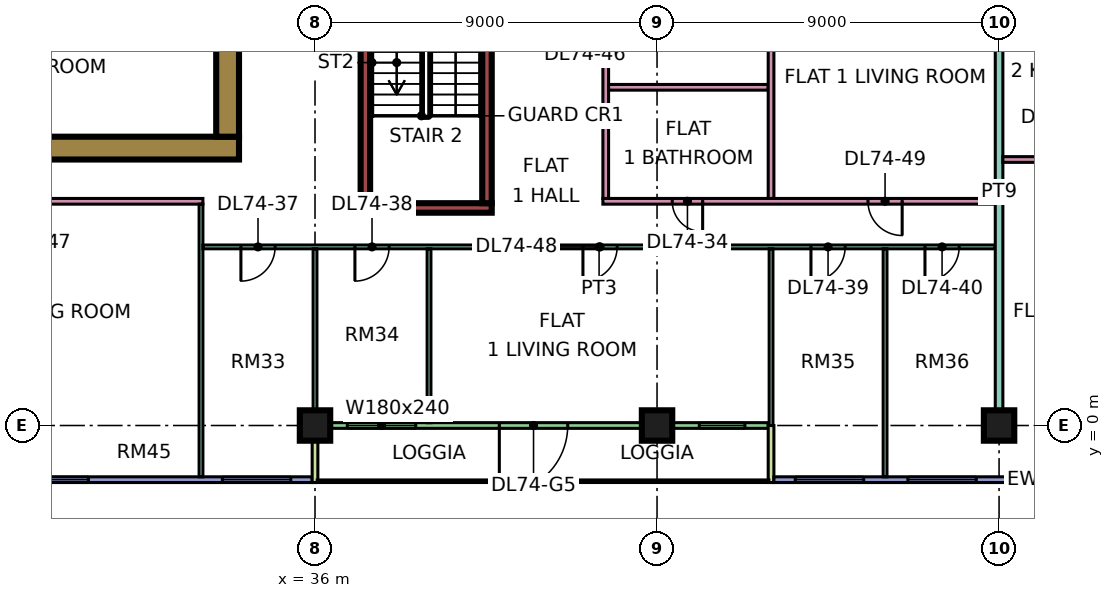
"""IFC4 building model, lengths in metres.
Left out: names, types, materials, properties, quantities, classifications, styles, units other than length and angle.
Written with IfcOpenShell. Run it as: python <this file> out.ifc"""

import sys

from ifc_helpers import new_model, si_unit, direction, frame, frame_2d, origin, origin_2d, place, context, subcontext, project, spatial, rectangle, extrude, element, fill, save


model = new_model("IFC4")
c1 = context("Model", 3, precision=1e-05, world=origin(), true_north=direction((0.0, 1.0)))
c2 = subcontext(c1, "Body", "Model", "MODEL_VIEW")
j1 = project(units=[si_unit("LENGTHUNIT", "METRE"), si_unit("PLANEANGLEUNIT", "RADIAN")], contexts=[c1])
p1 = place(None, origin())
s1 = spatial("IfcSite", under=j1, at=p1, CompositionType="ELEMENT")
p2 = place(p1, origin())
s2 = spatial("IfcBuilding", under=s1, at=p2, CompositionType="ELEMENT")
p3 = place(p2, frame((0.0, 0.0, 314.65)))
s3 = spatial("IfcBuildingStorey", under=s2, at=p3, CompositionType="ELEMENT", Elevation=314.65)
for number, where, z_axis, x_axis in (
    (1, (36.0, 0.0, 0.0), (0.0, 0.0, 1.0), (1.0, 0.0, 0.0)),
    (2, (45.0, 0.0, 0.0), (0.0, 0.0, 1.0), (1.0, 0.0, 0.0)),
    (3, (54.0, 0.0, 0.0), (0.0, 0.0, 1.0), (1.0, 0.0, 0.0)),
):
    element("IfcColumn", number, at=place(p3, frame(where, z_axis=z_axis, x_axis=x_axis)), inside=s3, PredefinedType="COLUMN", context=c2, shape_type="SweptSolid", body=[
        extrude(rectangle(XDim=0.8, YDim=0.8, at=origin_2d()), origin(), (0.0, 0.0, 1.0), 3.75),
    ])
p4 = place(p3, frame((9.0, 7.3, 0.0), z_axis=(0.0, 0.0, 1.0), x_axis=(1.0, 0.0, 0.0)))
e4 = element("IfcWall", 4, at=p4, inside=s3, PredefinedType="SHEAR", context=c2, shape_type="SweptSolid", body=[
    extrude(rectangle(XDim=25.0, YDim=0.6, at=frame_2d((12.5, 0.0))), origin(), (0.0, 0.0, 1.0), 3.75),
])
p5 = place(p3, frame((33.7, 7.6, 0.0), z_axis=(0.0, 0.0, 1.0), x_axis=(0.0, 1.0, 0.0)))
e5 = element("IfcWall", 5, at=p5, inside=s3, PredefinedType="SHEAR", context=c2, shape_type="SweptSolid", body=[
    extrude(rectangle(XDim=11.8, YDim=0.6, at=frame_2d((5.9, 0.0))), origin(), (0.0, 0.0, 1.0), 3.75),
])
p6 = place(p5, frame((5.6, 0.0, 0.0)))
e6 = element("IfcOpeningElement", 6, at=p6, cuts=e5, PredefinedType="OPENING", context=c2, shape_type="SweptSolid", body=[
    extrude(rectangle(XDim=1.8, YDim=2.4, at=frame_2d((0.9, 1.2))), frame((0.0, 0.31, 0.0), z_axis=(0.0, -1.0, 0.0), x_axis=(1.0, 0.0, 0.0)), (0.0, 0.0, 1.0), 0.62),
])
p7 = place(p3, frame((37.2, 5.725, 0.0), z_axis=(0.0, 0.0, 1.0), x_axis=(1.0, 0.0, 0.0)))
e7 = element("IfcWall", 7, at=p7, inside=s3, PredefinedType="SHEAR", context=c2, shape_type="SweptSolid", body=[
    extrude(rectangle(XDim=3.45, YDim=0.25, at=frame_2d((1.725, 0.0))), origin(), (0.0, 0.0, 1.0), 3.75),
])
for number, where, z_axis, x_axis in (
    (8, (37.325, 5.85, 0.0), (0.0, 0.0, 1.0), (0.0, 1.0, 0.0)),
    (9, (40.525, 5.85, 0.0), (0.0, 0.0, 1.0), (0.0, 1.0, 0.0)),
):
    element("IfcWall", number, at=place(p3, frame(where, z_axis=z_axis, x_axis=x_axis)), inside=s3, PredefinedType="SHEAR", context=c2, shape_type="SweptSolid", body=[
        extrude(rectangle(XDim=6.5, YDim=0.25, at=frame_2d((3.25, 0.0))), origin(), (0.0, 0.0, 1.0), 3.75),
    ])
p8 = place(p3, frame((24.075, -1.425, 0.0), z_axis=(0.0, 0.0, 1.0), x_axis=(1.0, 0.0, 0.0)))
e10 = element("IfcWall", 10, at=p8, inside=s3, PredefinedType="SOLIDWALL", context=c2, shape_type="SweptSolid", body=[
    extrude(rectangle(XDim=11.85, YDim=0.15, at=frame_2d((5.925, 0.0))), origin(), (0.0, 0.0, 1.0), 3.35),
])
p9 = place(p8, frame((2.962, 0.0, 0.45)))
e11 = element("IfcOpeningElement", 11, at=p9, cuts=e10, PredefinedType="OPENING", context=c2, shape_type="SweptSolid", body=[
    extrude(rectangle(XDim=3.0, YDim=2.4, at=frame_2d((1.5, 1.2))), frame((0.0, 0.085, 0.0), z_axis=(0.0, -1.0, 0.0), x_axis=(1.0, 0.0, 0.0)), (0.0, 0.0, 1.0), 0.17),
])
p10 = place(p8, frame((9.488, 0.0, 0.45)))
e12 = element("IfcOpeningElement", 12, at=p10, cuts=e10, PredefinedType="OPENING", context=c2, shape_type="SweptSolid", body=[
    extrude(rectangle(XDim=1.8, YDim=2.4, at=frame_2d((0.9, 1.2))), frame((0.0, 0.085, 0.0), z_axis=(0.0, -1.0, 0.0), x_axis=(1.0, 0.0, 0.0)), (0.0, 0.0, 1.0), 0.17),
])
p11 = place(p3, frame((36.075, 0.0, 0.0), z_axis=(0.0, 0.0, 1.0), x_axis=(1.0, 0.0, 0.0)))
e13 = element("IfcWall", 13, at=p11, inside=s3, PredefinedType="SOLIDWALL", context=c2, shape_type="SweptSolid", body=[
    extrude(rectangle(XDim=11.85, YDim=0.15, at=frame_2d((5.925, 0.0))), origin(), (0.0, 0.0, 1.0), 3.35),
])
p12 = place(p11, frame((0.775, 0.0, 0.45)))
e14 = element("IfcOpeningElement", 14, at=p12, cuts=e13, PredefinedType="OPENING", context=c2, shape_type="SweptSolid", body=[
    extrude(rectangle(XDim=1.8, YDim=2.4, at=frame_2d((0.9, 1.2))), frame((0.0, 0.085, 0.0), z_axis=(0.0, -1.0, 0.0), x_axis=(1.0, 0.0, 0.0)), (0.0, 0.0, 1.0), 0.17),
])
p13 = place(p11, frame((4.775, 0.0, 0.0)))
e15 = element("IfcOpeningElement", 15, at=p13, cuts=e13, PredefinedType="OPENING", context=c2, shape_type="SweptSolid", body=[
    extrude(rectangle(XDim=1.8, YDim=2.4, at=frame_2d((0.9, 1.2))), frame((0.0, 0.085, 0.0), z_axis=(0.0, -1.0, 0.0), x_axis=(1.0, 0.0, 0.0)), (0.0, 0.0, 1.0), 0.17),
])
p14 = place(p11, frame((10.038, 0.0, 0.45)))
e16 = element("IfcOpeningElement", 16, at=p14, cuts=e13, PredefinedType="OPENING", context=c2, shape_type="SweptSolid", body=[
    extrude(rectangle(XDim=1.2, YDim=2.4, at=frame_2d((0.6, 1.2))), frame((0.0, 0.085, 0.0), z_axis=(0.0, -1.0, 0.0), x_axis=(1.0, 0.0, 0.0)), (0.0, 0.0, 1.0), 0.17),
])
for number, where, z_axis, x_axis in (
    (17, (36.0, -1.5, 0.0), (0.0, 0.0, 1.0), (0.0, 1.0, 0.0)),
    (18, (48.0, -1.5, 0.0), (0.0, 0.0, 1.0), (0.0, 1.0, 0.0)),
):
    element("IfcWall", number, at=place(p3, frame(where, z_axis=z_axis, x_axis=x_axis)), inside=s3, PredefinedType="SOLIDWALL", context=c2, shape_type="SweptSolid", body=[
        extrude(rectangle(XDim=1.5, YDim=0.15, at=frame_2d((0.75, 0.0))), origin(), (0.0, 0.0, 1.0), 3.35),
    ])
p15 = place(p3, frame((48.075, -1.425, 0.0), z_axis=(0.0, 0.0, 1.0), x_axis=(1.0, 0.0, 0.0)))
e19 = element("IfcWall", 19, at=p15, inside=s3, PredefinedType="SOLIDWALL", context=c2, shape_type="SweptSolid", body=[
    extrude(rectangle(XDim=13.425, YDim=0.15, at=frame_2d((6.712, 0.0))), origin(), (0.0, 0.0, 1.0), 3.35),
])
p16 = place(p15, frame((0.562, 0.0, 0.45)))
e20 = element("IfcOpeningElement", 20, at=p16, cuts=e19, PredefinedType="OPENING", context=c2, shape_type="SweptSolid", body=[
    extrude(rectangle(XDim=1.8, YDim=2.4, at=frame_2d((0.9, 1.2))), frame((0.0, 0.085, 0.0), z_axis=(0.0, -1.0, 0.0), x_axis=(1.0, 0.0, 0.0)), (0.0, 0.0, 1.0), 0.17),
])
p17 = place(p15, frame((3.525, 0.0, 0.45)))
e21 = element("IfcOpeningElement", 21, at=p17, cuts=e19, PredefinedType="OPENING", context=c2, shape_type="SweptSolid", body=[
    extrude(rectangle(XDim=1.8, YDim=2.4, at=frame_2d((0.9, 1.2))), frame((0.0, 0.085, 0.0), z_axis=(0.0, -1.0, 0.0), x_axis=(1.0, 0.0, 0.0)), (0.0, 0.0, 1.0), 0.17),
])
p18 = place(p15, frame((7.425, 0.0, 0.45)))
e22 = element("IfcOpeningElement", 22, at=p18, cuts=e19, PredefinedType="OPENING", context=c2, shape_type="SweptSolid", body=[
    extrude(rectangle(XDim=3.0, YDim=2.4, at=frame_2d((1.5, 1.2))), frame((0.0, 0.085, 0.0), z_axis=(0.0, -1.0, 0.0), x_axis=(1.0, 0.0, 0.0)), (0.0, 0.0, 1.0), 0.17),
])
p19 = place(p15, frame((12.225, 0.0, 0.45)))
e23 = element("IfcOpeningElement", 23, at=p19, cuts=e19, PredefinedType="OPENING", context=c2, shape_type="SweptSolid", body=[
    extrude(rectangle(XDim=0.9, YDim=2.4, at=frame_2d((0.45, 1.2))), frame((0.0, 0.085, 0.0), z_axis=(0.0, -1.0, 0.0), x_axis=(1.0, 0.0, 0.0)), (0.0, 0.0, 1.0), 0.17),
])
p20 = place(p3, frame((11.95, 5.9, 0.0), z_axis=(0.0, 0.0, 1.0), x_axis=(1.0, 0.0, 0.0)))
e24 = element("IfcWall", 24, at=p20, inside=s3, PredefinedType="PARTITIONING", context=c2, shape_type="SweptSolid", body=[
    extrude(rectangle(XDim=21.1, YDim=0.15, at=frame_2d((10.55, 0.0))), origin(), (0.0, 0.0, 1.0), 3.35),
])
p21 = place(p20, frame((1.1, 0.0, 0.0)))
e25 = element("IfcOpeningElement", 25, at=p21, cuts=e24, PredefinedType="OPENING", context=c2, shape_type="SweptSolid", body=[
    extrude(rectangle(XDim=0.9, YDim=2.1, at=frame_2d((0.45, 1.05))), frame((0.0, 0.085, 0.0), z_axis=(0.0, -1.0, 0.0), x_axis=(1.0, 0.0, 0.0)), (0.0, 0.0, 1.0), 0.17),
])
p22 = place(p20, frame((4.1, 0.0, 0.0)))
e26 = element("IfcOpeningElement", 26, at=p22, cuts=e24, PredefinedType="OPENING", context=c2, shape_type="SweptSolid", body=[
    extrude(rectangle(XDim=0.9, YDim=2.1, at=frame_2d((0.45, 1.05))), frame((0.0, 0.085, 0.0), z_axis=(0.0, -1.0, 0.0), x_axis=(1.0, 0.0, 0.0)), (0.0, 0.0, 1.0), 0.17),
])
p23 = place(p20, frame((10.1, 0.0, 0.0)))
e27 = element("IfcOpeningElement", 27, at=p23, cuts=e24, PredefinedType="OPENING", context=c2, shape_type="SweptSolid", body=[
    extrude(rectangle(XDim=0.9, YDim=2.1, at=frame_2d((0.45, 1.05))), frame((0.0, 0.085, 0.0), z_axis=(0.0, -1.0, 0.0), x_axis=(1.0, 0.0, 0.0)), (0.0, 0.0, 1.0), 0.17),
])
p24 = place(p20, frame((16.1, 0.0, 0.0)))
e28 = element("IfcOpeningElement", 28, at=p24, cuts=e24, PredefinedType="OPENING", context=c2, shape_type="SweptSolid", body=[
    extrude(rectangle(XDim=0.9, YDim=2.1, at=frame_2d((0.45, 1.05))), frame((0.0, 0.085, 0.0), z_axis=(0.0, -1.0, 0.0), x_axis=(1.0, 0.0, 0.0)), (0.0, 0.0, 1.0), 0.17),
])
p25 = place(p3, frame((33.0, -1.35, 0.0), z_axis=(0.0, 0.0, 1.0), x_axis=(0.0, 1.0, 0.0)))
e29 = element("IfcWall", 29, at=p25, inside=s3, PredefinedType="PARTITIONING", context=c2, shape_type="SweptSolid", body=[
    extrude(rectangle(XDim=7.175, YDim=0.1, at=frame_2d((3.587, 0.0))), origin(), (0.0, 0.0, 1.0), 3.35),
])
p26 = place(p3, frame((33.05, 4.7, 0.0), z_axis=(0.0, 0.0, 1.0), x_axis=(1.0, 0.0, 0.0)))
e30 = element("IfcWall", 30, at=p26, inside=s3, PredefinedType="PARTITIONING", context=c2, shape_type="SweptSolid", body=[
    extrude(rectangle(XDim=20.85, YDim=0.1, at=frame_2d((10.425, 0.0))), origin(), (0.0, 0.0, 1.0), 3.35),
])
p27 = place(p26, frame((1.0, 0.0, 0.0)))
e31 = element("IfcOpeningElement", 31, at=p27, cuts=e30, PredefinedType="OPENING", context=c2, shape_type="SweptSolid", body=[
    extrude(rectangle(XDim=0.9, YDim=2.1, at=frame_2d((0.45, 1.05))), frame((0.0, 0.06, 0.0), z_axis=(0.0, -1.0, 0.0), x_axis=(1.0, 0.0, 0.0)), (0.0, 0.0, 1.0), 0.12),
])
p28 = place(p26, frame((4.0, 0.0, 0.0)))
e32 = element("IfcOpeningElement", 32, at=p28, cuts=e30, PredefinedType="OPENING", context=c2, shape_type="SweptSolid", body=[
    extrude(rectangle(XDim=0.9, YDim=2.1, at=frame_2d((0.45, 1.05))), frame((0.0, 0.06, 0.0), z_axis=(0.0, -1.0, 0.0), x_axis=(1.0, 0.0, 0.0)), (0.0, 0.0, 1.0), 0.12),
])
p29 = place(p26, frame((16.0, 0.0, 0.0)))
e33 = element("IfcOpeningElement", 33, at=p29, cuts=e30, PredefinedType="OPENING", context=c2, shape_type="SweptSolid", body=[
    extrude(rectangle(XDim=0.9, YDim=2.1, at=frame_2d((0.45, 1.05))), frame((0.0, 0.06, 0.0), z_axis=(0.0, -1.0, 0.0), x_axis=(1.0, 0.0, 0.0)), (0.0, 0.0, 1.0), 0.12),
])
p30 = place(p26, frame((19.0, 0.0, 0.0)))
e34 = element("IfcOpeningElement", 34, at=p30, cuts=e30, PredefinedType="OPENING", context=c2, shape_type="SweptSolid", body=[
    extrude(rectangle(XDim=0.9, YDim=2.1, at=frame_2d((0.45, 1.05))), frame((0.0, 0.06, 0.0), z_axis=(0.0, -1.0, 0.0), x_axis=(1.0, 0.0, 0.0)), (0.0, 0.0, 1.0), 0.12),
])
p31 = place(p26, frame((10.0, 0.0, 0.0)))
e35 = element("IfcOpeningElement", 35, at=p31, cuts=e30, PredefinedType="OPENING", context=c2, shape_type="SweptSolid", body=[
    extrude(rectangle(XDim=0.9, YDim=2.1, at=frame_2d((0.45, 1.05))), frame((0.0, 0.06, 0.0), z_axis=(0.0, -1.0, 0.0), x_axis=(1.0, 0.0, 0.0)), (0.0, 0.0, 1.0), 0.12),
])
p32 = place(p3, frame((36.0, 0.0, 0.0), z_axis=(0.0, 0.0, 1.0), x_axis=(0.0, 1.0, 0.0)))
e36 = element("IfcWall", 36, at=p32, inside=s3, PredefinedType="PARTITIONING", context=c2, shape_type="SweptSolid", body=[
    extrude(rectangle(XDim=4.65, YDim=0.1, at=frame_2d((2.325, 0.0))), origin(), (0.0, 0.0, 1.0), 3.35),
])
p33 = place(p3, frame((39.0, 0.074, 0.0), z_axis=(0.0, 0.0, 1.0), x_axis=(0.0, 1.0, 0.0)))
e37 = element("IfcWall", 37, at=p33, inside=s3, PredefinedType="PARTITIONING", context=c2, shape_type="SweptSolid", body=[
    extrude(rectangle(XDim=4.576, YDim=0.1, at=frame_2d((2.288, 0.0))), origin(), (0.0, 0.0, 1.0), 3.35),
])
p34 = place(p3, frame((43.575, 5.9, 0.0), z_axis=(0.0, 0.0, 1.0), x_axis=(1.0, 0.0, 0.0)))
e38 = element("IfcWall", 38, at=p34, inside=s3, PredefinedType="PARTITIONING", context=c2, shape_type="SweptSolid", body=[
    extrude(rectangle(XDim=10.325, YDim=0.15, at=frame_2d((5.163, 0.0))), origin(), (0.0, 0.0, 1.0), 3.35),
])
p35 = place(p34, frame((1.825, 0.0, 0.0)))
e39 = element("IfcOpeningElement", 39, at=p35, cuts=e38, PredefinedType="OPENING", context=c2, shape_type="SweptSolid", body=[
    extrude(rectangle(XDim=0.8, YDim=2.1, at=frame_2d((0.4, 1.05))), frame((0.0, 0.085, 0.0), z_axis=(0.0, -1.0, 0.0), x_axis=(1.0, 0.0, 0.0)), (0.0, 0.0, 1.0), 0.17),
])
p36 = place(p34, frame((6.975, 0.0, 0.0)))
e40 = element("IfcOpeningElement", 40, at=p36, cuts=e38, PredefinedType="OPENING", context=c2, shape_type="SweptSolid", body=[
    extrude(rectangle(XDim=0.9, YDim=2.1, at=frame_2d((0.45, 1.05))), frame((0.0, 0.085, 0.0), z_axis=(0.0, -1.0, 0.0), x_axis=(1.0, 0.0, 0.0)), (0.0, 0.0, 1.0), 0.17),
])
p37 = place(p3, frame((43.65, 5.975, 0.0), z_axis=(0.0, 0.0, 1.0), x_axis=(0.0, 1.0, 0.0)))
e41 = element("IfcWall", 41, at=p37, inside=s3, PredefinedType="PARTITIONING", context=c2, shape_type="SweptSolid", body=[
    extrude(rectangle(XDim=6.325, YDim=0.15, at=frame_2d((3.163, 0.0))), origin(), (0.0, 0.0, 1.0), 3.35),
])
p38 = place(p37, frame((4.275, 0.0, 0.0)))
e42 = element("IfcOpeningElement", 42, at=p38, cuts=e41, PredefinedType="OPENING", context=c2, shape_type="SweptSolid", body=[
    extrude(rectangle(XDim=0.9, YDim=2.1, at=frame_2d((0.45, 1.05))), frame((0.0, 0.085, 0.0), z_axis=(0.0, -1.0, 0.0), x_axis=(1.0, 0.0, 0.0)), (0.0, 0.0, 1.0), 0.17),
])
p39 = place(p3, frame((43.725, 8.9, 0.0), z_axis=(0.0, 0.0, 1.0), x_axis=(1.0, 0.0, 0.0)))
e43 = element("IfcWall", 43, at=p39, inside=s3, PredefinedType="PARTITIONING", context=c2, shape_type="SweptSolid", body=[
    extrude(rectangle(XDim=4.2, YDim=0.15, at=frame_2d((2.1, 0.0))), origin(), (0.0, 0.0, 1.0), 3.35),
])
p40 = place(p3, frame((48.0, 0.0, 0.0), z_axis=(0.0, 0.0, 1.0), x_axis=(0.0, 1.0, 0.0)))
e44 = element("IfcWall", 44, at=p40, inside=s3, PredefinedType="PARTITIONING", context=c2, shape_type="SweptSolid", body=[
    extrude(rectangle(XDim=4.65, YDim=0.1, at=frame_2d((2.325, 0.0))), origin(), (0.0, 0.0, 1.0), 3.35),
])
p41 = place(p3, frame((48.0, 5.975, 0.0), z_axis=(0.0, 0.0, 1.0), x_axis=(0.0, 1.0, 0.0)))
e45 = element("IfcWall", 45, at=p41, inside=s3, PredefinedType="PARTITIONING", context=c2, shape_type="SweptSolid", body=[
    extrude(rectangle(XDim=6.325, YDim=0.15, at=frame_2d((3.163, 0.0))), origin(), (0.0, 0.0, 1.0), 3.35),
])
p42 = place(p3, frame((51.0, -1.351, 0.0), z_axis=(0.0, 0.0, 1.0), x_axis=(0.0, 1.0, 0.0)))
e46 = element("IfcWall", 46, at=p42, inside=s3, PredefinedType="PARTITIONING", context=c2, shape_type="SweptSolid", body=[
    extrude(rectangle(XDim=6.001, YDim=0.1, at=frame_2d((3.0, 0.0))), origin(), (0.0, 0.0, 1.0), 3.35),
])
p43 = place(p3, frame((54.0, 0.0, 0.0), z_axis=(0.0, 0.0, 1.0), x_axis=(0.0, 1.0, 0.0)))
e47 = element("IfcWall", 47, at=p43, inside=s3, PredefinedType="PARTITIONING", context=c2, shape_type="SweptSolid", body=[
    extrude(rectangle(XDim=12.3, YDim=0.2, at=frame_2d((6.15, 0.0))), origin(), (0.0, 0.0, 1.0), 3.35),
])
p44 = place(p3, frame((54.1, 7.0, 0.0), z_axis=(0.0, 0.0, 1.0), x_axis=(1.0, 0.0, 0.0)))
e48 = element("IfcWall", 48, at=p44, inside=s3, PredefinedType="PARTITIONING", context=c2, shape_type="SweptSolid", body=[
    extrude(rectangle(XDim=5.975, YDim=0.15, at=frame_2d((2.987, 0.0))), origin(), (0.0, 0.0, 1.0), 3.35),
])
p45 = place(p44, frame((1.1, 0.0, 0.0)))
e49 = element("IfcOpeningElement", 49, at=p45, cuts=e48, PredefinedType="OPENING", context=c2, shape_type="SweptSolid", body=[
    extrude(rectangle(XDim=0.9, YDim=2.1, at=frame_2d((0.45, 1.05))), frame((0.0, 0.085, 0.0), z_axis=(0.0, -1.0, 0.0), x_axis=(1.0, 0.0, 0.0)), (0.0, 0.0, 1.0), 0.17),
])
p46 = place(p9, origin())
e50 = element("IfcWindow", 50, at=p46, inside=s3, PartitioningType="SINGLE_PANEL", PredefinedType="WINDOW", context=c2, shape_type="SweptSolid", body=[
    extrude(rectangle(XDim=3.0, YDim=2.4, at=frame_2d((1.5, 1.2))), frame((0.0, 0.03, 0.0), z_axis=(0.0, -1.0, 0.0), x_axis=(1.0, 0.0, 0.0)), (0.0, 0.0, 1.0), 0.06),
])
fill(e11, e50)
p47 = place(p10, origin())
e51 = element("IfcWindow", 51, at=p47, inside=s3, PartitioningType="SINGLE_PANEL", PredefinedType="WINDOW", context=c2, shape_type="SweptSolid", body=[
    extrude(rectangle(XDim=1.8, YDim=2.4, at=frame_2d((0.9, 1.2))), frame((0.0, 0.03, 0.0), z_axis=(0.0, -1.0, 0.0), x_axis=(1.0, 0.0, 0.0)), (0.0, 0.0, 1.0), 0.06),
])
fill(e12, e51)
p48 = place(p12, origin())
e52 = element("IfcWindow", 52, at=p48, inside=s3, PartitioningType="SINGLE_PANEL", PredefinedType="WINDOW", context=c2, shape_type="SweptSolid", body=[
    extrude(rectangle(XDim=1.8, YDim=2.4, at=frame_2d((0.9, 1.2))), frame((0.0, 0.03, 0.0), z_axis=(0.0, -1.0, 0.0), x_axis=(1.0, 0.0, 0.0)), (0.0, 0.0, 1.0), 0.06),
])
fill(e14, e52)
p49 = place(p13, frame((1.8, 0.0, 0.0), z_axis=(0.0, 0.0, 1.0), x_axis=(-1.0, 0.0, 0.0)))
e53 = element("IfcDoor", 53, at=p49, inside=s3, OperationType="DOUBLE_DOOR_SINGLE_SWING", PredefinedType="DOOR", context=c2, shape_type="SweptSolid", body=[
    extrude(rectangle(XDim=1.8, YDim=2.4, at=frame_2d((0.9, 1.2))), frame((0.0, 0.025, 0.0), z_axis=(0.0, -1.0, 0.0), x_axis=(1.0, 0.0, 0.0)), (0.0, 0.0, 1.0), 0.05),
])
fill(e15, e53)
p50 = place(p14, origin())
e54 = element("IfcWindow", 54, at=p50, inside=s3, PartitioningType="SINGLE_PANEL", PredefinedType="WINDOW", context=c2, shape_type="SweptSolid", body=[
    extrude(rectangle(XDim=1.2, YDim=2.4, at=frame_2d((0.6, 1.2))), frame((0.0, 0.03, 0.0), z_axis=(0.0, -1.0, 0.0), x_axis=(1.0, 0.0, 0.0)), (0.0, 0.0, 1.0), 0.06),
])
fill(e16, e54)
p51 = place(p16, origin())
e55 = element("IfcWindow", 55, at=p51, inside=s3, PartitioningType="SINGLE_PANEL", PredefinedType="WINDOW", context=c2, shape_type="SweptSolid", body=[
    extrude(rectangle(XDim=1.8, YDim=2.4, at=frame_2d((0.9, 1.2))), frame((0.0, 0.03, 0.0), z_axis=(0.0, -1.0, 0.0), x_axis=(1.0, 0.0, 0.0)), (0.0, 0.0, 1.0), 0.06),
])
fill(e20, e55)
p52 = place(p17, origin())
e56 = element("IfcWindow", 56, at=p52, inside=s3, PartitioningType="SINGLE_PANEL", PredefinedType="WINDOW", context=c2, shape_type="SweptSolid", body=[
    extrude(rectangle(XDim=1.8, YDim=2.4, at=frame_2d((0.9, 1.2))), frame((0.0, 0.03, 0.0), z_axis=(0.0, -1.0, 0.0), x_axis=(1.0, 0.0, 0.0)), (0.0, 0.0, 1.0), 0.06),
])
fill(e21, e56)
p53 = place(p35, origin())
e57 = element("IfcDoor", 57, at=p53, inside=s3, OperationType="SINGLE_SWING_RIGHT", PredefinedType="DOOR", context=c2, shape_type="SweptSolid", body=[
    extrude(rectangle(XDim=0.8, YDim=2.1, at=frame_2d((0.4, 1.05))), frame((0.0, 0.025, 0.0), z_axis=(0.0, -1.0, 0.0), x_axis=(1.0, 0.0, 0.0)), (0.0, 0.0, 1.0), 0.05),
])
fill(e39, e57)
p54 = place(p27, frame((0.9, 0.0, 0.0), z_axis=(0.0, 0.0, 1.0), x_axis=(-1.0, 0.0, 0.0)))
e58 = element("IfcDoor", 58, at=p54, inside=s3, OperationType="SINGLE_SWING_LEFT", PredefinedType="DOOR", context=c2, shape_type="SweptSolid", body=[
    extrude(rectangle(XDim=0.9, YDim=2.1, at=frame_2d((0.45, 1.05))), frame((0.0, 0.025, 0.0), z_axis=(0.0, -1.0, 0.0), x_axis=(1.0, 0.0, 0.0)), (0.0, 0.0, 1.0), 0.05),
])
fill(e31, e58)
p55 = place(p28, frame((0.9, 0.0, 0.0), z_axis=(0.0, 0.0, 1.0), x_axis=(-1.0, 0.0, 0.0)))
e59 = element("IfcDoor", 59, at=p55, inside=s3, OperationType="SINGLE_SWING_LEFT", PredefinedType="DOOR", context=c2, shape_type="SweptSolid", body=[
    extrude(rectangle(XDim=0.9, YDim=2.1, at=frame_2d((0.45, 1.05))), frame((0.0, 0.025, 0.0), z_axis=(0.0, -1.0, 0.0), x_axis=(1.0, 0.0, 0.0)), (0.0, 0.0, 1.0), 0.05),
])
fill(e32, e59)
p56 = place(p29, frame((0.9, 0.0, 0.0), z_axis=(0.0, 0.0, 1.0), x_axis=(-1.0, 0.0, 0.0)))
e60 = element("IfcDoor", 60, at=p56, inside=s3, OperationType="SINGLE_SWING_LEFT", PredefinedType="DOOR", context=c2, shape_type="SweptSolid", body=[
    extrude(rectangle(XDim=0.9, YDim=2.1, at=frame_2d((0.45, 1.05))), frame((0.0, 0.025, 0.0), z_axis=(0.0, -1.0, 0.0), x_axis=(1.0, 0.0, 0.0)), (0.0, 0.0, 1.0), 0.05),
])
fill(e33, e60)
p57 = place(p30, frame((0.9, 0.0, 0.0), z_axis=(0.0, 0.0, 1.0), x_axis=(-1.0, 0.0, 0.0)))
e61 = element("IfcDoor", 61, at=p57, inside=s3, OperationType="SINGLE_SWING_LEFT", PredefinedType="DOOR", context=c2, shape_type="SweptSolid", body=[
    extrude(rectangle(XDim=0.9, YDim=2.1, at=frame_2d((0.45, 1.05))), frame((0.0, 0.025, 0.0), z_axis=(0.0, -1.0, 0.0), x_axis=(1.0, 0.0, 0.0)), (0.0, 0.0, 1.0), 0.05),
])
fill(e34, e61)
p58 = place(p31, frame((0.9, 0.0, 0.0), z_axis=(0.0, 0.0, 1.0), x_axis=(-1.0, 0.0, 0.0)))
e62 = element("IfcDoor", 62, at=p58, inside=s3, OperationType="SINGLE_SWING_LEFT", PredefinedType="DOOR", context=c2, shape_type="SweptSolid", body=[
    extrude(rectangle(XDim=0.9, YDim=2.1, at=frame_2d((0.45, 1.05))), frame((0.0, 0.025, 0.0), z_axis=(0.0, -1.0, 0.0), x_axis=(1.0, 0.0, 0.0)), (0.0, 0.0, 1.0), 0.05),
])
fill(e35, e62)
p59 = place(p36, origin())
e63 = element("IfcDoor", 63, at=p59, inside=s3, OperationType="SINGLE_SWING_RIGHT", PredefinedType="DOOR", context=c2, shape_type="SweptSolid", body=[
    extrude(rectangle(XDim=0.9, YDim=2.1, at=frame_2d((0.45, 1.05))), frame((0.0, 0.025, 0.0), z_axis=(0.0, -1.0, 0.0), x_axis=(1.0, 0.0, 0.0)), (0.0, 0.0, 1.0), 0.05),
])
fill(e40, e63)
save(model, sys.argv[1])
